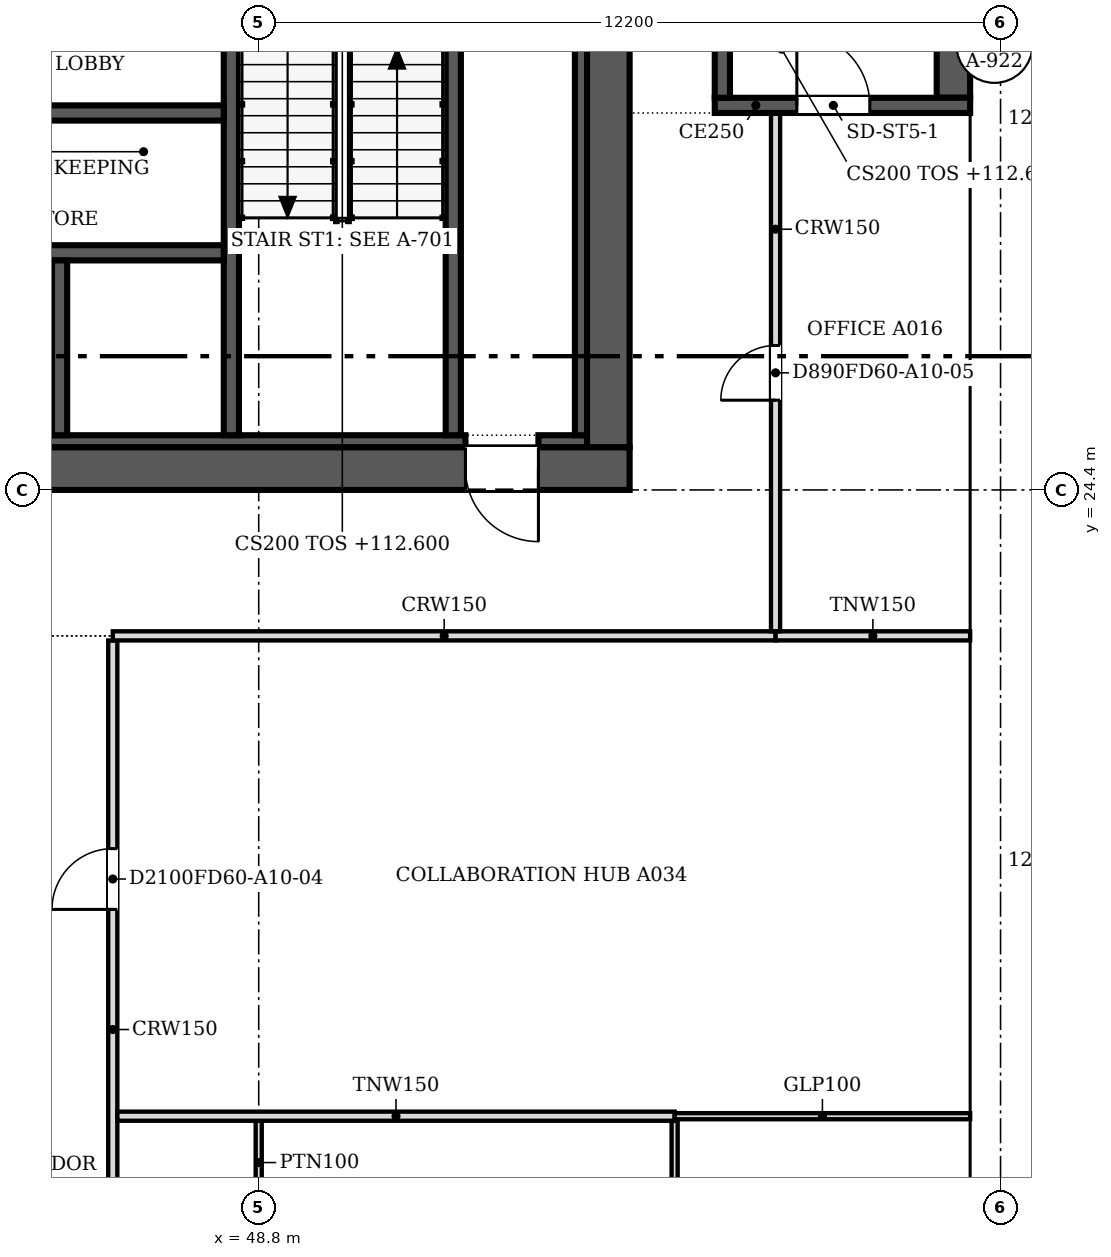
"""IFC4 building model, lengths in metres.
Left out: names, types, materials, properties, quantities, classifications, styles, units other than length and angle.
Written with IfcOpenShell. Run it as: python <this file> out.ifc"""

import sys

from ifc_helpers import new_model, si_unit, direction, frame, frame_2d, origin, place, context, subcontext, project, spatial, polyline, rectangle, outline, extrude, faceted_brep, source, transform, mapped, element, fill, save


model = new_model("IFC4")
c1 = context("Model", 3, precision=1e-05, world=origin(), true_north=direction((0.0, 1.0)))
c2 = subcontext(c1, "Body", "Model", "MODEL_VIEW")
j1 = project(units=[si_unit("LENGTHUNIT", "METRE"), si_unit("PLANEANGLEUNIT", "RADIAN")], contexts=[c1])
p1 = place(None, origin())
s1 = spatial("IfcSite", under=j1, at=p1, CompositionType="ELEMENT")
p2 = place(p1, origin())
s2 = spatial("IfcBuilding", under=s1, at=p2, CompositionType="ELEMENT")
p3 = place(p2, frame((0.0, 0.0, 112.6)))
s3 = spatial("IfcBuildingStorey", under=s2, at=p3, CompositionType="ELEMENT", Elevation=112.6)
m1 = source(origin(), c2, "Body", "SweptSolid", [
    extrude(outline(polyline([(6.1, 0.0), (3.05, 3.8), (0.0, 0.0), (6.1, 0.0)])), frame((0.0, 0.25, 0.0), z_axis=(0.0, -1.0, 0.0), x_axis=(1.0, 0.0, 0.0)), (0.0, 0.0, 1.0), 0.5),
])
p4 = place(p3, frame((60.75, 12.2, 0.0), z_axis=(0.0, 0.0, 1.0), x_axis=(0.0, 1.0, 0.0)))
e1 = element("IfcWall", 1, at=p4, inside=s3, PredefinedType="SOLIDWALL", context=c2, shape_type="MappedRepresentation", body=[
    mapped(m1, transform((0.0, 0.0, 0.0), scale=1.0)),
])
m2 = source(origin(), c2, "Body", "SweptSolid", [
    extrude(outline(polyline([(5.579, 0.25), (3.05, 3.4), (0.521, 0.25), (5.579, 0.25)])), frame((0.0, 0.26, 0.0), z_axis=(0.0, -1.0, 0.0), x_axis=(1.0, 0.0, 0.0)), (0.0, 0.0, 1.0), 0.52),
])
p5 = place(p4, origin())
e2 = element("IfcOpeningElement", 2, at=p5, cuts=e1, PredefinedType="OPENING", context=c2, shape_type="MappedRepresentation", body=[
    mapped(m2, transform((0.0, 0.0, 0.0), scale=1.0)),
])
m3 = source(origin(), c2, "Body", "Brep", [
    faceted_brep([(6.1, -0.25, 0.0), (3.05, -0.25, 3.8), (0.0, -0.25, 0.0), (6.1, -0.25, 0.0), (0.0, 0.25, 0.0), (3.05, 0.25, 3.8), (6.1, 0.25, 0.0), (6.1, 0.25, 0.0)], [[[0, 1, 2, 3]], [[4, 5, 6, 7]], [[6, 5, 1, 0]], [[5, 4, 2, 1]], [[4, 7, 3, 2]], [[3, 7, 6, 0]]]),
])
p6 = place(p3, frame((60.75, 18.3, 0.0), z_axis=(0.0, 0.0, 1.0), x_axis=(0.0, 1.0, 0.0)))
e3 = element("IfcWall", 3, at=p6, inside=s3, PredefinedType="SOLIDWALL", context=c2, shape_type="MappedRepresentation", body=[
    mapped(m3, transform((0.0, 0.0, 0.0), scale=1.0)),
])
p7 = place(p6, origin())
e4 = element("IfcOpeningElement", 4, at=p7, cuts=e3, PredefinedType="OPENING", context=c2, shape_type="MappedRepresentation", body=[
    mapped(m2, transform((0.0, 0.0, 0.0), scale=1.0)),
])
p8 = place(p3, frame((60.75, 24.4, 0.0), z_axis=(0.0, 0.0, 1.0), x_axis=(0.0, 1.0, 0.0)))
e5 = element("IfcWall", 5, at=p8, inside=s3, PredefinedType="SOLIDWALL", context=c2, shape_type="MappedRepresentation", body=[
    mapped(m1, transform((0.0, 0.0, 0.0), scale=1.0)),
])
p9 = place(p8, origin())
e6 = element("IfcOpeningElement", 6, at=p9, cuts=e5, PredefinedType="OPENING", context=c2, shape_type="MappedRepresentation", body=[
    mapped(m2, transform((0.0, 0.0, 0.0), scale=1.0)),
])
p10 = place(p3, frame((60.75, 30.5, 0.0), z_axis=(0.0, 0.0, 1.0), x_axis=(0.0, 1.0, 0.0)))
e7 = element("IfcWall", 7, at=p10, inside=s3, PredefinedType="SOLIDWALL", context=c2, shape_type="MappedRepresentation", body=[
    mapped(m1, transform((0.0, 0.0, 0.0), scale=1.0)),
])
p11 = place(p10, origin())
e8 = element("IfcOpeningElement", 8, at=p11, cuts=e7, PredefinedType="OPENING", context=c2, shape_type="MappedRepresentation", body=[
    mapped(m2, transform((0.0, 0.0, 0.0), scale=1.0)),
])
p12 = place(p2, frame((0.0, 0.0, 116.4)))
s4 = spatial("IfcBuildingStorey", under=s2, at=p12, CompositionType="ELEMENT", Elevation=116.4)
m4 = source(origin(), c2, "Body", "SweptSolid", [
    extrude(outline(polyline([(3.05, 0.0), (6.1, 3.8), (3.05, 7.6), (0.0, 3.8), (3.05, 0.0)])), frame((0.0, 0.25, 0.0), z_axis=(0.0, -1.0, 0.0), x_axis=(1.0, 0.0, 0.0)), (0.0, 0.0, 1.0), 0.5),
])
p13 = place(p12, frame((60.75, 9.15, -3.8), z_axis=(0.0, 0.0, 1.0), x_axis=(0.0, 1.0, 0.0)))
e9 = element("IfcWall", 9, at=p13, inside=s4, PredefinedType="SOLIDWALL", context=c2, shape_type="MappedRepresentation", body=[
    mapped(m4, transform((0.0, 0.0, 0.0), scale=1.0)),
])
m5 = source(origin(), c2, "Body", "SweptSolid", [
    extrude(outline(polyline([(3.05, 0.399), (5.78, 3.8), (3.05, 7.2), (0.321, 3.8), (3.05, 0.399)])), frame((0.0, 0.26, 0.0), z_axis=(0.0, -1.0, 0.0), x_axis=(1.0, 0.0, 0.0)), (0.0, 0.0, 1.0), 0.52),
])
p14 = place(p13, origin())
e10 = element("IfcOpeningElement", 10, at=p14, cuts=e9, PredefinedType="OPENING", context=c2, shape_type="MappedRepresentation", body=[
    mapped(m5, transform((0.0, 0.0, 0.0), scale=1.0)),
])
p15 = place(p12, frame((60.75, 15.25, -3.8), z_axis=(0.0, 0.0, 1.0), x_axis=(0.0, 1.0, 0.0)))
e11 = element("IfcWall", 11, at=p15, inside=s4, PredefinedType="SOLIDWALL", context=c2, shape_type="MappedRepresentation", body=[
    mapped(m4, transform((0.0, 0.0, 0.0), scale=1.0)),
])
p16 = place(p15, origin())
e12 = element("IfcOpeningElement", 12, at=p16, cuts=e11, PredefinedType="OPENING", context=c2, shape_type="MappedRepresentation", body=[
    mapped(m5, transform((0.0, 0.0, 0.0), scale=1.0)),
])
m6 = source(origin(), c2, "Body", "Brep", [
    faceted_brep([(3.05, -0.25, 0.0), (6.1, -0.25, 3.8), (6.1, -0.25, 3.8), (3.05, -0.25, 7.6), (0.0, -0.25, 3.8), (0.0, 0.25, 3.8), (3.05, 0.25, 7.6), (6.1, 0.25, 3.8), (6.1, 0.25, 3.8), (3.05, 0.25, 0.0)], [[[0, 1, 2, 3, 4]], [[5, 6, 7, 8, 9]], [[9, 8, 1, 0]], [[7, 6, 3, 2]], [[6, 5, 4, 3]], [[5, 9, 0, 4]], [[1, 8, 7, 2]]]),
])
p17 = place(p12, frame((60.75, 21.35, -3.8), z_axis=(0.0, 0.0, 1.0), x_axis=(0.0, 1.0, 0.0)))
e13 = element("IfcWall", 13, at=p17, inside=s4, PredefinedType="SOLIDWALL", context=c2, shape_type="MappedRepresentation", body=[
    mapped(m6, transform((0.0, 0.0, 0.0), scale=1.0)),
])
p18 = place(p17, origin())
e14 = element("IfcOpeningElement", 14, at=p18, cuts=e13, PredefinedType="OPENING", context=c2, shape_type="MappedRepresentation", body=[
    mapped(m5, transform((0.0, 0.0, 0.0), scale=1.0)),
])
p19 = place(p12, frame((60.75, 27.45, -3.8), z_axis=(0.0, 0.0, 1.0), x_axis=(0.0, 1.0, 0.0)))
e15 = element("IfcWall", 15, at=p19, inside=s4, PredefinedType="SOLIDWALL", context=c2, shape_type="MappedRepresentation", body=[
    mapped(m4, transform((0.0, 0.0, 0.0), scale=1.0)),
])
p20 = place(p19, origin())
e16 = element("IfcOpeningElement", 16, at=p20, cuts=e15, PredefinedType="OPENING", context=c2, shape_type="MappedRepresentation", body=[
    mapped(m5, transform((0.0, 0.0, 0.0), scale=1.0)),
])
p21 = place(p3, frame((54.9, 24.75, 0.0), z_axis=(0.0, 0.0, 1.0), x_axis=(-1.0, 0.0, 0.0)))
e17 = element("IfcWall", 17, at=p21, inside=s3, PredefinedType="SHEAR", context=c2, shape_type="SweptSolid", body=[
    extrude(rectangle(XDim=24.4, YDim=0.7, at=frame_2d((12.2, 0.0))), origin(), (0.0, 0.0, 1.0), 3.8),
])
m7 = source(origin(), c2, "Body", "SweptSolid", [
    extrude(rectangle(XDim=1.2, YDim=2.1, at=frame_2d((0.6, 1.05))), frame((0.0, 0.36, 0.0), z_axis=(0.0, -1.0, 0.0), x_axis=(1.0, 0.0, 0.0)), (0.0, 0.0, 1.0), 0.72),
])
p22 = place(p21, frame((1.5, 0.0, 0.0)))
e18 = element("IfcOpeningElement", 18, at=p22, cuts=e17, PredefinedType="OPENING", context=c2, shape_type="MappedRepresentation", body=[
    mapped(m7, transform((0.0, 0.0, 0.0), scale=1.0)),
])
p23 = place(p3, frame((54.55, 48.1, 0.0), z_axis=(0.0, 0.0, 1.0), x_axis=(0.0, -1.0, 0.0)))
e19 = element("IfcWall", 19, at=p23, inside=s3, PredefinedType="SHEAR", context=c2, shape_type="SweptSolid", body=[
    extrude(rectangle(XDim=23.0, YDim=0.7, at=frame_2d((11.5, 0.0))), origin(), (0.0, 0.0, 1.0), 3.8),
])
p24 = place(p23, frame((4.8, 0.0, 0.0)))
e20 = element("IfcOpeningElement", 20, at=p24, cuts=e19, PredefinedType="OPENING", context=c2, shape_type="MappedRepresentation", body=[
    mapped(m7, transform((0.0, 0.0, 0.0), scale=1.0)),
])
p25 = place(p3, frame((31.2, 25.2, 0.0), z_axis=(0.0, 0.0, 1.0), x_axis=(1.0, 0.0, 0.0)))
e21 = element("IfcWall", 21, at=p25, inside=s3, PredefinedType="SOLIDWALL", context=c2, shape_type="SweptSolid", body=[
    extrude(rectangle(XDim=21.0, YDim=0.2, at=frame_2d((10.5, 0.0))), origin(), (0.0, 0.0, 1.0), 3.8),
])
p26 = place(p3, frame((53.4, 25.2, 0.0), z_axis=(0.0, 0.0, 1.0), x_axis=(1.0, 0.0, 0.0)))
e22 = element("IfcWall", 22, at=p26, inside=s3, PredefinedType="SOLIDWALL", context=c2, shape_type="SweptSolid", body=[
    extrude(rectangle(XDim=0.8, YDim=0.2, at=frame_2d((0.4, 0.0))), origin(), (0.0, 0.0, 1.0), 3.8),
])
p27 = place(p3, frame((54.1, 25.3, 0.0), z_axis=(0.0, 0.0, 1.0), x_axis=(0.0, 1.0, 0.0)))
e23 = element("IfcWall", 23, at=p27, inside=s3, PredefinedType="SOLIDWALL", context=c2, shape_type="SweptSolid", body=[
    extrude(rectangle(XDim=11.02, YDim=0.2, at=frame_2d((5.51, 0.0))), origin(), (0.0, 0.0, 1.0), 3.8),
])
p28 = place(p3, frame((48.35, 36.35, 0.0), z_axis=(0.0, 0.0, 1.0), x_axis=(0.0, -1.0, 0.0)))
e24 = element("IfcWall", 24, at=p28, inside=s3, PredefinedType="SOLIDWALL", context=c2, shape_type="SweptSolid", body=[
    extrude(rectangle(XDim=11.05, YDim=0.25, at=frame_2d((5.525, 0.0))), origin(), (0.0, 0.0, 1.0), 3.8),
])
m8 = source(origin(), c2, "Body", "SweptSolid", [
    extrude(rectangle(XDim=1.2, YDim=2.1, at=frame_2d((0.6, 1.05))), frame((0.0, 0.135, 0.0), z_axis=(0.0, -1.0, 0.0), x_axis=(1.0, 0.0, 0.0)), (0.0, 0.0, 1.0), 0.27),
])
p29 = place(p28, frame((3.225, 0.0, 0.0)))
e25 = element("IfcOpeningElement", 25, at=p29, cuts=e24, PredefinedType="OPENING", context=c2, shape_type="MappedRepresentation", body=[
    mapped(m8, transform((0.0, 0.0, 0.0), scale=1.0)),
])
p30 = place(p3, frame((52.0, 25.3, 0.0), z_axis=(0.0, 0.0, 1.0), x_axis=(0.0, 1.0, 0.0)))
e26 = element("IfcWall", 26, at=p30, inside=s3, PredefinedType="SOLIDWALL", context=c2, shape_type="SweptSolid", body=[
    extrude(rectangle(XDim=7.975, YDim=0.25, at=frame_2d((3.987, 0.0))), origin(), (0.0, 0.0, 1.0), 3.8),
])
p31 = place(p30, frame((6.625, 0.0, 0.0)))
e27 = element("IfcOpeningElement", 27, at=p31, cuts=e26, PredefinedType="OPENING", context=c2, shape_type="MappedRepresentation", body=[
    mapped(m8, transform((0.0, 0.0, 0.0), scale=1.0)),
])
for number, where, z_axis, x_axis in (
    (28, (42.95, 28.3, 0.0), (0.0, 0.0, 1.0), (1.0, 0.0, 0.0)),
    (29, (42.95, 30.6, 0.0), (0.0, 0.0, 1.0), (1.0, 0.0, 0.0)),
):
    element("IfcWall", number, at=place(p3, frame(where, z_axis=z_axis, x_axis=x_axis)), inside=s3, PredefinedType="SOLIDWALL", context=c2, shape_type="SweptSolid", body=[
        extrude(rectangle(XDim=5.275, YDim=0.25, at=frame_2d((2.638, 0.0))), origin(), (0.0, 0.0, 1.0), 3.8),
    ])
p32 = place(p3, frame((45.525, 25.3, 0.0), z_axis=(0.0, 0.0, 1.0), x_axis=(0.0, 1.0, 0.0)))
e30 = element("IfcWall", 30, at=p32, inside=s3, PredefinedType="SOLIDWALL", context=c2, shape_type="SweptSolid", body=[
    extrude(rectangle(XDim=2.875, YDim=0.25, at=frame_2d((1.438, 0.0))), origin(), (0.0, 0.0, 1.0), 3.8),
])
p33 = place(p3, frame((60.5, 30.725, 0.0), z_axis=(0.0, 0.0, 1.0), x_axis=(-1.0, 0.0, 0.0)))
e31 = element("IfcWall", 31, at=p33, inside=s3, PredefinedType="SOLIDWALL", context=c2, shape_type="SweptSolid", body=[
    extrude(rectangle(XDim=4.2, YDim=0.25, at=frame_2d((2.1, 0.0))), origin(), (0.0, 0.0, 1.0), 3.8),
])
p34 = place(p33, frame((1.65, 0.0, 0.0)))
e32 = element("IfcOpeningElement", 32, at=p34, cuts=e31, PredefinedType="OPENING", context=c2, shape_type="MappedRepresentation", body=[
    mapped(m8, transform((0.0, 0.0, 0.0), scale=1.0)),
])
p35 = place(p3, frame((56.425, 30.85, 0.0), z_axis=(0.0, 0.0, 1.0), x_axis=(0.0, 1.0, 0.0)))
e33 = element("IfcWall", 33, at=p35, inside=s3, PredefinedType="SOLIDWALL", context=c2, shape_type="SweptSolid", body=[
    extrude(rectangle(XDim=8.0, YDim=0.25, at=frame_2d((4.0, 0.0))), origin(), (0.0, 0.0, 1.0), 3.8),
])
p36 = place(p3, frame((60.225, 38.85, 0.0), z_axis=(0.0, 0.0, 1.0), x_axis=(0.0, -1.0, 0.0)))
e34 = element("IfcWall", 34, at=p36, inside=s3, PredefinedType="SOLIDWALL", context=c2, shape_type="SweptSolid", body=[
    extrude(rectangle(XDim=8.0, YDim=0.55, at=frame_2d((4.0, 0.0))), origin(), (0.0, 0.0, 1.0), 3.8),
])
p37 = place(p3, frame((46.4, 21.924, 0.0), z_axis=(0.0, 0.0, 1.0), x_axis=(0.0, -1.0, 0.0)))
e35 = element("IfcWall", 35, at=p37, inside=s3, PredefinedType="PARTITIONING", context=c2, shape_type="SweptSolid", body=[
    extrude(rectangle(XDim=17.724, YDim=0.15, at=frame_2d((8.862, 0.0))), origin(), (0.0, 0.0, 1.0), 3.067),
])
m9 = source(origin(), c2, "Body", "SweptSolid", [
    extrude(rectangle(XDim=1.0, YDim=2.1, at=frame_2d((0.5, 1.05))), frame((0.0, 0.085, 0.0), z_axis=(0.0, -1.0, 0.0), x_axis=(1.0, 0.0, 0.0)), (0.0, 0.0, 1.0), 0.17),
])
p38 = place(p37, frame((3.423, 0.0, 0.0)))
e36 = element("IfcOpeningElement", 36, at=p38, cuts=e35, PredefinedType="OPENING", context=c2, shape_type="MappedRepresentation", body=[
    mapped(m9, transform((0.0, 0.0, 0.0), scale=1.0)),
])
m10 = source(origin(), c2, "Body", "SweptSolid", [
    extrude(rectangle(XDim=0.9, YDim=2.1, at=frame_2d((0.45, 1.05))), frame((0.0, 0.085, 0.0), z_axis=(0.0, -1.0, 0.0), x_axis=(1.0, 0.0, 0.0)), (0.0, 0.0, 1.0), 0.17),
])
p39 = place(p37, frame((12.324, 0.0, 0.0)))
e37 = element("IfcOpeningElement", 37, at=p39, cuts=e35, PredefinedType="OPENING", context=c2, shape_type="MappedRepresentation", body=[
    mapped(m10, transform((0.0, 0.0, 0.0), scale=1.0)),
])
p40 = place(p3, frame((55.64, 14.024, 0.0), z_axis=(0.0, 0.0, 1.0), x_axis=(0.0, -1.0, 0.0)))
e38 = element("IfcWall", 38, at=p40, inside=s3, PredefinedType="PARTITIONING", context=c2, shape_type="SweptSolid", body=[
    extrude(rectangle(XDim=5.924, YDim=0.1, at=frame_2d((2.962, 0.0))), origin(), (0.0, 0.0, 1.0), 3.067),
])
m11 = source(origin(), c2, "Body", "SweptSolid", [
    extrude(rectangle(XDim=0.9, YDim=2.1, at=frame_2d((0.45, 1.05))), frame((0.0, 0.06, 0.0), z_axis=(0.0, -1.0, 0.0), x_axis=(1.0, 0.0, 0.0)), (0.0, 0.0, 1.0), 0.12),
])
p41 = place(p40, frame((2.524, 0.0, 0.0)))
e39 = element("IfcOpeningElement", 39, at=p41, cuts=e38, PredefinedType="OPENING", context=c2, shape_type="MappedRepresentation", body=[
    mapped(m11, transform((0.0, 0.0, 0.0), scale=1.0)),
])
p42 = place(p3, frame((48.8, 12.65, 0.0), z_axis=(0.0, 0.0, 1.0), x_axis=(0.0, 1.0, 0.0)))
e40 = element("IfcWall", 40, at=p42, inside=s3, PredefinedType="PARTITIONING", context=c2, shape_type="SweptSolid", body=[
    extrude(rectangle(XDim=1.375, YDim=0.1, at=frame_2d((0.688, 0.0))), origin(), (0.0, 0.0, 1.0), 3.067),
])
p43 = place(p3, frame((46.476, 14.1, 0.0), z_axis=(0.0, 0.0, 1.0), x_axis=(1.0, 0.0, 0.0)))
e41 = element("IfcWall", 41, at=p43, inside=s3, PredefinedType="PARTITIONING", context=c2, shape_type="SweptSolid", body=[
    extrude(rectangle(XDim=9.164, YDim=0.15, at=frame_2d((4.582, 0.0))), origin(), (0.0, 0.0, 1.0), 3.067),
])
p44 = place(p3, frame((55.641, 14.1, 0.0), z_axis=(0.0, 0.0, 1.0), x_axis=(1.0, 0.0, 0.0)))
e42 = element("IfcWall", 42, at=p44, inside=s3, PredefinedType="PARTITIONING", context=c2, shape_type="SweptSolid", body=[
    extrude(rectangle(XDim=4.859, YDim=0.1, at=frame_2d((2.429, 0.0))), origin(), (0.0, 0.0, 1.0), 3.067),
])
p45 = place(p3, frame((46.4, 22.0, 0.0), z_axis=(0.0, 0.0, 1.0), x_axis=(1.0, 0.0, 0.0)))
e43 = element("IfcWall", 43, at=p45, inside=s3, PredefinedType="PARTITIONING", context=c2, shape_type="SweptSolid", body=[
    extrude(rectangle(XDim=10.9, YDim=0.15, at=frame_2d((5.45, 0.0))), origin(), (0.0, 0.0, 1.0), 3.067),
])
p46 = place(p3, frame((57.301, 22.0, 0.0), z_axis=(0.0, 0.0, 1.0), x_axis=(1.0, 0.0, 0.0)))
e44 = element("IfcWall", 44, at=p46, inside=s3, PredefinedType="PARTITIONING", context=c2, shape_type="SweptSolid", body=[
    extrude(rectangle(XDim=3.199, YDim=0.15, at=frame_2d((1.6, 0.0))), origin(), (0.0, 0.0, 1.0), 3.067),
])
p47 = place(p3, frame((57.3, 30.6, 0.0), z_axis=(0.0, 0.0, 1.0), x_axis=(0.0, -1.0, 0.0)))
e45 = element("IfcWall", 45, at=p47, inside=s3, PredefinedType="PARTITIONING", context=c2, shape_type="SweptSolid", body=[
    extrude(rectangle(XDim=8.524, YDim=0.15, at=frame_2d((4.262, 0.0))), origin(), (0.0, 0.0, 1.0), 3.067),
])
p48 = place(p47, frame((3.824, 0.0, 0.0)))
e46 = element("IfcOpeningElement", 46, at=p48, cuts=e45, PredefinedType="OPENING", context=c2, shape_type="MappedRepresentation", body=[
    mapped(m10, transform((0.0, 0.0, 0.0), scale=1.0)),
])
m12 = source(origin(), c2, "Body", "SweptSolid", [
    extrude(rectangle(XDim=1.2, YDim=2.1, at=frame_2d((0.6, 1.05))), frame((0.0, 0.025, 0.0), z_axis=(0.0, -1.0, 0.0), x_axis=(1.0, 0.0, 0.0)), (0.0, 0.0, 1.0), 0.05),
])
p49 = place(p22, origin())
e47 = element("IfcDoor", 47, at=p49, inside=s3, OperationType="SINGLE_SWING_LEFT", PredefinedType="DOOR", context=c2, shape_type="MappedRepresentation", body=[
    mapped(m12, transform((0.0, 0.0, 0.0), scale=1.0)),
])
fill(e18, e47)
p50 = place(p34, origin())
e48 = element("IfcDoor", 48, at=p50, inside=s3, OperationType="SINGLE_SWING_RIGHT", PredefinedType="DOOR", context=c2, shape_type="MappedRepresentation", body=[
    mapped(m12, transform((0.0, 0.0, 0.0), scale=1.0)),
])
fill(e32, e48)
m13 = source(origin(), c2, "Body", "SweptSolid", [
    extrude(rectangle(XDim=1.0, YDim=2.1, at=frame_2d((0.5, 1.05))), frame((0.0, 0.025, 0.0), z_axis=(0.0, -1.0, 0.0), x_axis=(1.0, 0.0, 0.0)), (0.0, 0.0, 1.0), 0.05),
])
p51 = place(p38, origin())
e49 = element("IfcDoor", 49, at=p51, inside=s3, OperationType="SINGLE_SWING_RIGHT", PredefinedType="DOOR", context=c2, shape_type="MappedRepresentation", body=[
    mapped(m13, transform((0.0, 0.0, 0.0), scale=1.0)),
])
fill(e36, e49)
m14 = source(origin(), c2, "Body", "SweptSolid", [
    extrude(rectangle(XDim=0.9, YDim=2.1, at=frame_2d((0.45, 1.05))), frame((0.0, 0.025, 0.0), z_axis=(0.0, -1.0, 0.0), x_axis=(1.0, 0.0, 0.0)), (0.0, 0.0, 1.0), 0.05),
])
p52 = place(p48, origin())
e50 = element("IfcDoor", 50, at=p52, inside=s3, OperationType="SINGLE_SWING_RIGHT", PredefinedType="DOOR", context=c2, shape_type="MappedRepresentation", body=[
    mapped(m14, transform((0.0, 0.0, 0.0), scale=1.0)),
])
fill(e46, e50)
save(model, sys.argv[1])
